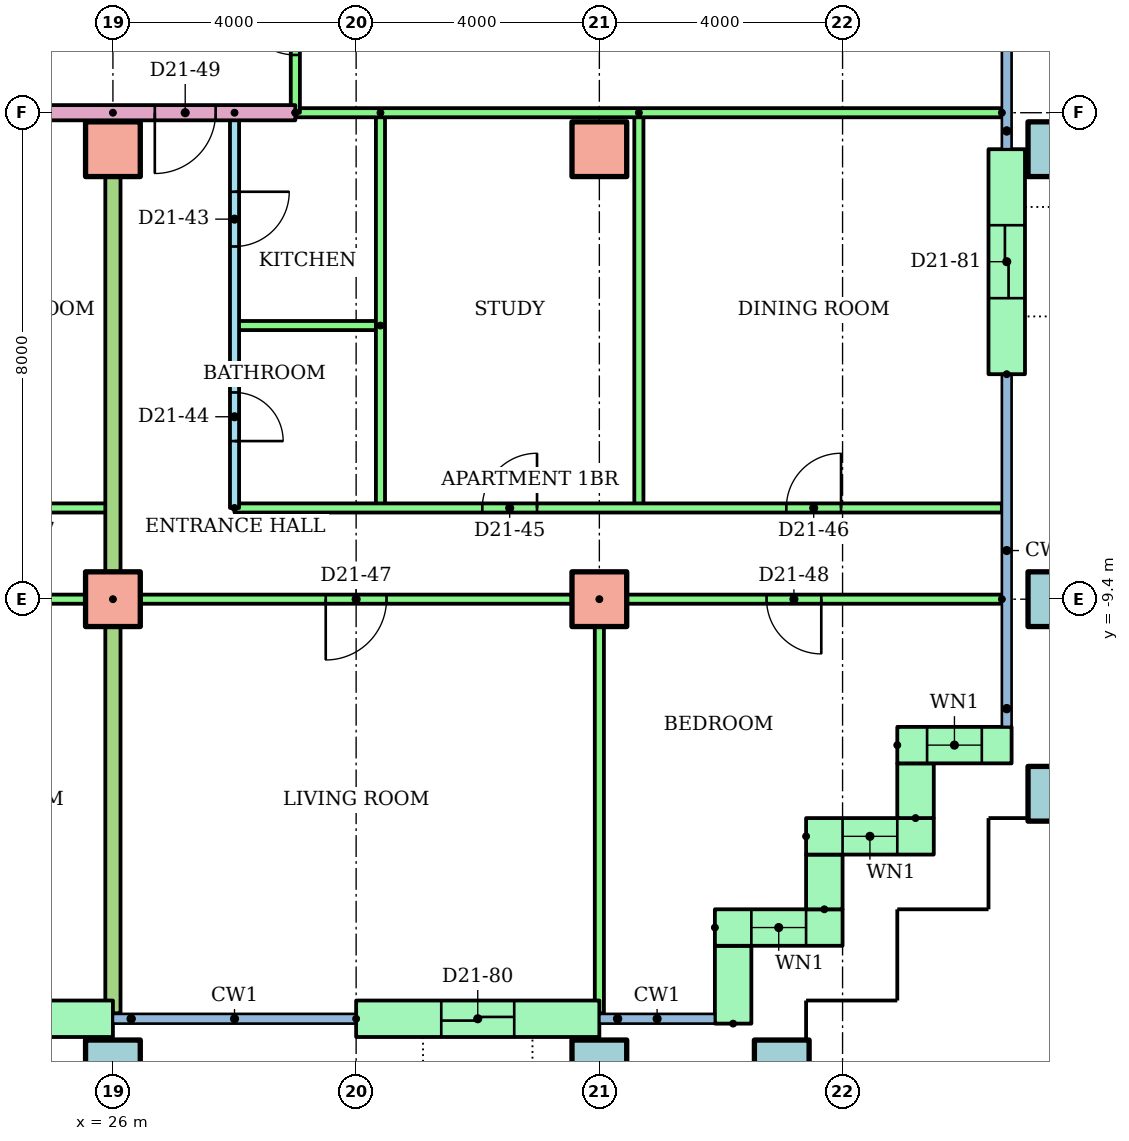
"""IFC4 building model, lengths in metres.
Left out: names, types, materials, properties, quantities, classifications, styles, units other than length and angle.
Written with IfcOpenShell. Run it as: python <this file> out.ifc"""

import sys

from ifc_helpers import new_model, si_unit, direction, frame, frame_2d, origin, origin_2d, place, context, subcontext, project, spatial, rectangle, hollow_rectangle, extrude, element, fill, save


model = new_model("IFC4")
c1 = context("Model", 3, precision=1e-05, world=origin(), true_north=direction((0.0, 1.0)))
c2 = subcontext(c1, "Body", "Model", "MODEL_VIEW")
j1 = project(units=[si_unit("LENGTHUNIT", "METRE"), si_unit("PLANEANGLEUNIT", "RADIAN")], contexts=[c1])
p1 = place(None, origin())
s1 = spatial("IfcSite", under=j1, at=p1, CompositionType="ELEMENT")
p2 = place(p1, origin())
s2 = spatial("IfcBuilding", under=s1, at=p2, CompositionType="ELEMENT")
p3 = place(p2, frame((0.0, 0.0, 83.9)))
s3 = spatial("IfcBuildingStorey", under=s2, at=p3, CompositionType="ELEMENT", Elevation=83.9)
for number, where in (
    (1, (26.0, -17.1, 0.0)),
    (2, (34.0, -17.1, 0.0)),
    (3, (37.0, -17.1, 0.0)),
    (4, (41.5, -12.6, 0.0)),
):
    element("IfcColumn", number, at=place(p3, frame(where)), inside=s3, PredefinedType="COLUMN", context=c2, shape_type="SweptSolid", body=[
        extrude(hollow_rectangle(XDim=0.9, YDim=0.9, WallThickness=0.045, at=origin_2d()), origin(), (0.0, 0.0, 1.0), 3.2),
    ])
for number, where in (
    (5, (26.0, -9.4, 0.0)),
    (6, (34.0, -9.4, 0.0)),
):
    element("IfcColumn", number, at=place(p3, frame(where)), inside=s3, PredefinedType="COLUMN", context=c2, shape_type="SweptSolid", body=[
        extrude(rectangle(XDim=0.9, YDim=0.9, at=origin_2d()), origin(), (0.0, 0.0, 1.0), 3.2),
    ])
p4 = place(p3, frame((41.5, -9.4, 0.0)))
e7 = element("IfcColumn", 7, at=p4, inside=s3, PredefinedType="COLUMN", context=c2, shape_type="SweptSolid", body=[
    extrude(hollow_rectangle(XDim=0.9, YDim=0.9, WallThickness=0.045, at=origin_2d()), origin(), (0.0, 0.0, 1.0), 3.2),
])
for number, where in (
    (8, (26.0, -2.0, 0.0)),
    (9, (34.0, -2.0, 0.0)),
):
    element("IfcColumn", number, at=place(p3, frame(where)), inside=s3, PredefinedType="COLUMN", context=c2, shape_type="SweptSolid", body=[
        extrude(rectangle(XDim=0.9, YDim=0.9, at=origin_2d()), origin(), (0.0, 0.0, 1.0), 3.2),
    ])
p5 = place(p3, frame((41.5, -2.0, 0.0)))
e10 = element("IfcColumn", 10, at=p5, inside=s3, PredefinedType="COLUMN", context=c2, shape_type="SweptSolid", body=[
    extrude(hollow_rectangle(XDim=0.9, YDim=0.9, WallThickness=0.045, at=origin_2d()), origin(), (0.0, 0.0, 1.0), 3.2),
])
p6 = place(p3, frame((22.0, -16.3, 0.0)))
e11 = element("IfcWall", 11, at=p6, inside=s3, PredefinedType="STANDARD", context=c2, shape_type="SweptSolid", body=[
    extrude(rectangle(XDim=4.0, YDim=0.6, at=frame_2d((2.0, 0.0))), origin(), (0.0, 0.0, 1.0), 2.92),
])
p7 = place(p6, frame((1.4, 0.0, 0.0)))
e12 = element("IfcOpeningElement", 12, at=p7, cuts=e11, PredefinedType="OPENING", context=c2, shape_type="SweptSolid", body=[
    extrude(rectangle(XDim=1.2, YDim=2.1, at=frame_2d((0.6, 1.05))), frame((0.0, 0.31, 0.0), z_axis=(0.0, -1.0, 0.0), x_axis=(1.0, 0.0, 0.0)), (0.0, 0.0, 1.0), 0.62),
])
p8 = place(p3, frame((30.0, -16.3, 0.0)))
e13 = element("IfcWall", 13, at=p8, inside=s3, PredefinedType="STANDARD", context=c2, shape_type="SweptSolid", body=[
    extrude(rectangle(XDim=4.0, YDim=0.6, at=frame_2d((2.0, 0.0))), origin(), (0.0, 0.0, 1.0), 2.92),
])
p9 = place(p8, frame((1.4, 0.0, 0.0)))
e14 = element("IfcOpeningElement", 14, at=p9, cuts=e13, PredefinedType="OPENING", context=c2, shape_type="SweptSolid", body=[
    extrude(rectangle(XDim=1.2, YDim=2.1, at=frame_2d((0.6, 1.05))), frame((0.0, 0.31, 0.0), z_axis=(0.0, -1.0, 0.0), x_axis=(1.0, 0.0, 0.0)), (0.0, 0.0, 1.0), 0.62),
])
p10 = place(p3, frame((36.2, -16.38, 0.0), z_axis=(0.0, 0.0, 1.0), x_axis=(0.0, 1.0, 0.0)))
e15 = element("IfcWall", 15, at=p10, inside=s3, PredefinedType="STANDARD", context=c2, shape_type="SweptSolid", body=[
    extrude(rectangle(XDim=1.28, YDim=0.6, at=frame_2d((0.64, 0.0))), origin(), (0.0, 0.0, 1.0), 2.92),
])
p11 = place(p3, frame((35.9, -14.8, 0.0)))
e16 = element("IfcWall", 16, at=p11, inside=s3, PredefinedType="STANDARD", context=c2, shape_type="SweptSolid", body=[
    extrude(rectangle(XDim=2.1, YDim=0.6, at=frame_2d((1.05, 0.0))), origin(), (0.0, 0.0, 1.0), 2.92),
])
p12 = place(p11, frame((0.6, 0.0, 0.9)))
e17 = element("IfcOpeningElement", 17, at=p12, cuts=e16, PredefinedType="OPENING", context=c2, shape_type="SweptSolid", body=[
    extrude(rectangle(XDim=0.9, YDim=1.5, at=frame_2d((0.45, 0.75))), frame((0.0, 0.31, 0.0), z_axis=(0.0, -1.0, 0.0), x_axis=(1.0, 0.0, 0.0)), (0.0, 0.0, 1.0), 0.62),
])
p13 = place(p3, frame((37.7, -14.5, 0.0), z_axis=(0.0, 0.0, 1.0), x_axis=(0.0, 1.0, 0.0)))
e18 = element("IfcWall", 18, at=p13, inside=s3, PredefinedType="STANDARD", context=c2, shape_type="SweptSolid", body=[
    extrude(rectangle(XDim=0.9, YDim=0.6, at=frame_2d((0.45, 0.0))), origin(), (0.0, 0.0, 1.0), 2.92),
])
p14 = place(p3, frame((37.4, -13.3, 0.0)))
e19 = element("IfcWall", 19, at=p14, inside=s3, PredefinedType="STANDARD", context=c2, shape_type="SweptSolid", body=[
    extrude(rectangle(XDim=2.1, YDim=0.6, at=frame_2d((1.05, 0.0))), origin(), (0.0, 0.0, 1.0), 2.92),
])
p15 = place(p14, frame((0.6, 0.0, 0.9)))
e20 = element("IfcOpeningElement", 20, at=p15, cuts=e19, PredefinedType="OPENING", context=c2, shape_type="SweptSolid", body=[
    extrude(rectangle(XDim=0.9, YDim=1.5, at=frame_2d((0.45, 0.75))), frame((0.0, 0.31, 0.0), z_axis=(0.0, -1.0, 0.0), x_axis=(1.0, 0.0, 0.0)), (0.0, 0.0, 1.0), 0.62),
])
p16 = place(p3, frame((39.2, -13.0, 0.0), z_axis=(0.0, 0.0, 1.0), x_axis=(0.0, 1.0, 0.0)))
e21 = element("IfcWall", 21, at=p16, inside=s3, PredefinedType="STANDARD", context=c2, shape_type="SweptSolid", body=[
    extrude(rectangle(XDim=0.9, YDim=0.6, at=frame_2d((0.45, 0.0))), origin(), (0.0, 0.0, 1.0), 2.92),
])
p17 = place(p3, frame((38.9, -11.8, 0.0)))
e22 = element("IfcWall", 22, at=p17, inside=s3, PredefinedType="STANDARD", context=c2, shape_type="SweptSolid", body=[
    extrude(rectangle(XDim=1.88, YDim=0.6, at=frame_2d((0.94, 0.0))), origin(), (0.0, 0.0, 1.0), 2.92),
])
p18 = place(p17, frame((0.49, 0.0, 0.9)))
e23 = element("IfcOpeningElement", 23, at=p18, cuts=e22, PredefinedType="OPENING", context=c2, shape_type="SweptSolid", body=[
    extrude(rectangle(XDim=0.9, YDim=1.5, at=frame_2d((0.45, 0.75))), frame((0.0, 0.31, 0.0), z_axis=(0.0, -1.0, 0.0), x_axis=(1.0, 0.0, 0.0)), (0.0, 0.0, 1.0), 0.62),
])
p19 = place(p3, frame((40.7, -5.7, 0.0), z_axis=(0.0, 0.0, 1.0), x_axis=(0.0, 1.0, 0.0)))
e24 = element("IfcWall", 24, at=p19, inside=s3, PredefinedType="STANDARD", context=c2, shape_type="SweptSolid", body=[
    extrude(rectangle(XDim=3.7, YDim=0.6, at=frame_2d((1.85, 0.0))), origin(), (0.0, 0.0, 1.0), 2.92),
])
p20 = place(p19, frame((1.25, 0.0, 0.0)))
e25 = element("IfcOpeningElement", 25, at=p20, cuts=e24, PredefinedType="OPENING", context=c2, shape_type="SweptSolid", body=[
    extrude(rectangle(XDim=1.2, YDim=2.1, at=frame_2d((0.6, 1.05))), frame((0.0, 0.31, 0.0), z_axis=(0.0, -1.0, 0.0), x_axis=(1.0, 0.0, 0.0)), (0.0, 0.0, 1.0), 0.62),
])
p21 = place(p3, frame((12.0, -7.9, 0.0)))
e26 = element("IfcWall", 26, at=p21, inside=s3, PredefinedType="PARTITIONING", context=c2, shape_type="SweptSolid", body=[
    extrude(rectangle(XDim=14.0, YDim=0.15, at=frame_2d((7.0, 0.0))), origin(), (0.0, 0.0, 1.0), 2.4),
])
p22 = place(p21, frame((4.325, 0.0, 0.0)))
e27 = element("IfcOpeningElement", 27, at=p22, cuts=e26, PredefinedType="OPENING", context=c2, shape_type="SweptSolid", body=[
    extrude(rectangle(XDim=0.9, YDim=2.1, at=frame_2d((0.45, 1.05))), frame((0.0, 0.085, 0.0), z_axis=(0.0, -1.0, 0.0), x_axis=(1.0, 0.0, 0.0)), (0.0, 0.0, 1.0), 0.17),
])
p23 = place(p21, frame((8.575, 0.0, 0.0)))
e28 = element("IfcOpeningElement", 28, at=p23, cuts=e26, PredefinedType="OPENING", context=c2, shape_type="SweptSolid", body=[
    extrude(rectangle(XDim=0.9, YDim=2.1, at=frame_2d((0.45, 1.05))), frame((0.0, 0.085, 0.0), z_axis=(0.0, -1.0, 0.0), x_axis=(1.0, 0.0, 0.0)), (0.0, 0.0, 1.0), 0.17),
])
p24 = place(p21, frame((12.0, 0.0, 0.0)))
e29 = element("IfcOpeningElement", 29, at=p24, cuts=e26, PredefinedType="OPENING", context=c2, shape_type="SweptSolid", body=[
    extrude(rectangle(XDim=0.9, YDim=2.1, at=frame_2d((0.45, 1.05))), frame((0.0, 0.085, 0.0), z_axis=(0.0, -1.0, 0.0), x_axis=(1.0, 0.0, 0.0)), (0.0, 0.0, 1.0), 0.17),
])
p25 = place(p3, frame((26.0, -9.4, 0.0), z_axis=(0.0, 0.0, 1.0), x_axis=(-1.0, 0.0, 0.0)))
e30 = element("IfcWall", 30, at=p25, inside=s3, PredefinedType="PARTITIONING", context=c2, shape_type="SweptSolid", body=[
    extrude(rectangle(XDim=16.0, YDim=0.15, at=frame_2d((8.0, 0.0))), origin(), (0.0, 0.0, 1.0), 2.4),
])
p26 = place(p25, frame((13.55, 0.0, 0.0)))
e31 = element("IfcOpeningElement", 31, at=p26, cuts=e30, PredefinedType="OPENING", context=c2, shape_type="SweptSolid", body=[
    extrude(rectangle(XDim=0.9, YDim=2.1, at=frame_2d((0.45, 1.05))), frame((0.0, 0.085, 0.0), z_axis=(0.0, -1.0, 0.0), x_axis=(1.0, 0.0, 0.0)), (0.0, 0.0, 1.0), 0.17),
])
p27 = place(p25, frame((9.55, 0.0, 0.0)))
e32 = element("IfcOpeningElement", 32, at=p27, cuts=e30, PredefinedType="OPENING", context=c2, shape_type="SweptSolid", body=[
    extrude(rectangle(XDim=0.9, YDim=2.1, at=frame_2d((0.45, 1.05))), frame((0.0, 0.085, 0.0), z_axis=(0.0, -1.0, 0.0), x_axis=(1.0, 0.0, 0.0)), (0.0, 0.0, 1.0), 0.17),
])
p28 = place(p25, frame((5.55, 0.0, 0.0)))
e33 = element("IfcOpeningElement", 33, at=p28, cuts=e30, PredefinedType="OPENING", context=c2, shape_type="SweptSolid", body=[
    extrude(rectangle(XDim=0.9, YDim=2.1, at=frame_2d((0.45, 1.05))), frame((0.0, 0.085, 0.0), z_axis=(0.0, -1.0, 0.0), x_axis=(1.0, 0.0, 0.0)), (0.0, 0.0, 1.0), 0.17),
])
p29 = place(p25, frame((1.5, 0.0, 0.0)))
e34 = element("IfcOpeningElement", 34, at=p29, cuts=e30, PredefinedType="OPENING", context=c2, shape_type="SweptSolid", body=[
    extrude(rectangle(XDim=1.0, YDim=2.1, at=frame_2d((0.5, 1.05))), frame((0.0, 0.085, 0.0), z_axis=(0.0, -1.0, 0.0), x_axis=(1.0, 0.0, 0.0)), (0.0, 0.0, 1.0), 0.17),
])
p30 = place(p3, frame((28.0, -1.4, 0.0), z_axis=(0.0, 0.0, 1.0), x_axis=(0.0, -1.0, 0.0)))
e35 = element("IfcWall", 35, at=p30, inside=s3, PredefinedType="PARTITIONING", context=c2, shape_type="SweptSolid", body=[
    extrude(rectangle(XDim=6.5, YDim=0.15, at=frame_2d((3.25, 0.0))), origin(), (0.0, 0.0, 1.0), 2.4),
])
p31 = place(p30, frame((1.3, 0.0, 0.0)))
e36 = element("IfcOpeningElement", 36, at=p31, cuts=e35, PredefinedType="OPENING", context=c2, shape_type="SweptSolid", body=[
    extrude(rectangle(XDim=0.9, YDim=2.1, at=frame_2d((0.45, 1.05))), frame((0.0, 0.085, 0.0), z_axis=(0.0, -1.0, 0.0), x_axis=(1.0, 0.0, 0.0)), (0.0, 0.0, 1.0), 0.17),
])
p32 = place(p30, frame((4.6, 0.0, 0.0)))
e37 = element("IfcOpeningElement", 37, at=p32, cuts=e35, PredefinedType="OPENING", context=c2, shape_type="SweptSolid", body=[
    extrude(rectangle(XDim=0.8, YDim=2.1, at=frame_2d((0.4, 1.05))), frame((0.0, 0.085, 0.0), z_axis=(0.0, -1.0, 0.0), x_axis=(1.0, 0.0, 0.0)), (0.0, 0.0, 1.0), 0.17),
])
p33 = place(p3, frame((30.4, -4.9, 0.0), z_axis=(0.0, 0.0, 1.0), x_axis=(-1.0, 0.0, 0.0)))
e38 = element("IfcWall", 38, at=p33, inside=s3, PredefinedType="PARTITIONING", context=c2, shape_type="SweptSolid", body=[
    extrude(rectangle(XDim=2.4, YDim=0.15, at=frame_2d((1.2, 0.0))), origin(), (0.0, 0.0, 1.0), 2.4),
])
for number, where, z_axis, x_axis in (
    (39, (30.4, -1.4, 0.0), (0.0, 0.0, 1.0), (0.0, -1.0, 0.0)),
    (40, (34.65, -1.4, 0.0), (0.0, 0.0, 1.0), (0.0, -1.0, 0.0)),
):
    element("IfcWall", number, at=place(p3, frame(where, z_axis=z_axis, x_axis=x_axis)), inside=s3, PredefinedType="PARTITIONING", context=c2, shape_type="SweptSolid", body=[
        extrude(rectangle(XDim=6.5, YDim=0.15, at=frame_2d((3.25, 0.0))), origin(), (0.0, 0.0, 1.0), 2.4),
    ])
p34 = place(p3, frame((28.0, -7.9, 0.0)))
e41 = element("IfcWall", 41, at=p34, inside=s3, PredefinedType="PARTITIONING", context=c2, shape_type="SweptSolid", body=[
    extrude(rectangle(XDim=12.62, YDim=0.15, at=frame_2d((6.31, 0.0))), origin(), (0.0, 0.0, 1.0), 2.4),
])
p35 = place(p34, frame((4.075, 0.0, 0.0)))
e42 = element("IfcOpeningElement", 42, at=p35, cuts=e41, PredefinedType="OPENING", context=c2, shape_type="SweptSolid", body=[
    extrude(rectangle(XDim=0.9, YDim=2.1, at=frame_2d((0.45, 1.05))), frame((0.0, 0.085, 0.0), z_axis=(0.0, -1.0, 0.0), x_axis=(1.0, 0.0, 0.0)), (0.0, 0.0, 1.0), 0.17),
])
p36 = place(p34, frame((9.075, 0.0, 0.0)))
e43 = element("IfcOpeningElement", 43, at=p36, cuts=e41, PredefinedType="OPENING", context=c2, shape_type="SweptSolid", body=[
    extrude(rectangle(XDim=0.9, YDim=2.1, at=frame_2d((0.45, 1.05))), frame((0.0, 0.085, 0.0), z_axis=(0.0, -1.0, 0.0), x_axis=(1.0, 0.0, 0.0)), (0.0, 0.0, 1.0), 0.17),
])
p37 = place(p3, frame((40.62, -9.4, 0.0), z_axis=(0.0, 0.0, 1.0), x_axis=(-1.0, 0.0, 0.0)))
e44 = element("IfcWall", 44, at=p37, inside=s3, PredefinedType="PARTITIONING", context=c2, shape_type="SweptSolid", body=[
    extrude(rectangle(XDim=14.62, YDim=0.15, at=frame_2d((7.31, 0.0))), origin(), (0.0, 0.0, 1.0), 2.4),
])
p38 = place(p37, frame((10.12, 0.0, 0.0)))
e45 = element("IfcOpeningElement", 45, at=p38, cuts=e44, PredefinedType="OPENING", context=c2, shape_type="SweptSolid", body=[
    extrude(rectangle(XDim=1.0, YDim=2.1, at=frame_2d((0.5, 1.05))), frame((0.0, 0.085, 0.0), z_axis=(0.0, -1.0, 0.0), x_axis=(1.0, 0.0, 0.0)), (0.0, 0.0, 1.0), 0.17),
])
p39 = place(p37, frame((2.97, 0.0, 0.0)))
e46 = element("IfcOpeningElement", 46, at=p39, cuts=e44, PredefinedType="OPENING", context=c2, shape_type="SweptSolid", body=[
    extrude(rectangle(XDim=0.9, YDim=2.1, at=frame_2d((0.45, 1.05))), frame((0.0, 0.085, 0.0), z_axis=(0.0, -1.0, 0.0), x_axis=(1.0, 0.0, 0.0)), (0.0, 0.0, 1.0), 0.17),
])
p40 = place(p3, frame((34.0, -9.4, 0.0), z_axis=(0.0, 0.0, 1.0), x_axis=(0.0, -1.0, 0.0)))
e47 = element("IfcWall", 47, at=p40, inside=s3, PredefinedType="PARTITIONING", context=c2, shape_type="SweptSolid", body=[
    extrude(rectangle(XDim=6.81, YDim=0.15, at=frame_2d((3.405, 0.0))), origin(), (0.0, 0.0, 1.0), 2.4),
])
p41 = place(p3, frame((26.0, -1.4, 0.0), z_axis=(0.0, 0.0, 1.0), x_axis=(0.0, -1.0, 0.0)))
e48 = element("IfcWall", 48, at=p41, inside=s3, PredefinedType="PARTITIONING", context=c2, shape_type="SweptSolid", body=[
    extrude(rectangle(XDim=14.81, YDim=0.25, at=frame_2d((7.405, 0.0))), origin(), (0.0, 0.0, 1.0), 2.4),
])
p42 = place(p3, frame((29.0, -1.4, 0.0), z_axis=(0.0, 0.0, 1.0), x_axis=(-1.0, 0.0, 0.0)))
e49 = element("IfcWall", 49, at=p42, inside=s3, PredefinedType="PARTITIONING", context=c2, shape_type="SweptSolid", body=[
    extrude(rectangle(XDim=15.0, YDim=0.25, at=frame_2d((7.5, 0.0))), origin(), (0.0, 0.0, 1.0), 2.4),
])
p43 = place(p42, frame((1.311, 0.0, 0.0)))
e50 = element("IfcOpeningElement", 50, at=p43, cuts=e49, PredefinedType="OPENING", context=c2, shape_type="SweptSolid", body=[
    extrude(rectangle(XDim=1.0, YDim=2.1, at=frame_2d((0.5, 1.05))), frame((0.0, 0.135, 0.0), z_axis=(0.0, -1.0, 0.0), x_axis=(1.0, 0.0, 0.0)), (0.0, 0.0, 1.0), 0.27),
])
p44 = place(p3, frame((40.62, -1.4, 0.0), z_axis=(0.0, 0.0, 1.0), x_axis=(-1.0, 0.0, 0.0)))
e51 = element("IfcWall", 51, at=p44, inside=s3, PredefinedType="PARTITIONING", context=c2, shape_type="SweptSolid", body=[
    extrude(rectangle(XDim=11.62, YDim=0.15, at=frame_2d((5.81, 0.0))), origin(), (0.0, 0.0, 1.0), 2.4),
])
p45 = place(p3, frame((29.0, -1.4, 0.0), z_axis=(0.0, 0.0, 1.0), x_axis=(0.0, 1.0, 0.0)))
e52 = element("IfcWall", 52, at=p45, inside=s3, PredefinedType="PARTITIONING", context=c2, shape_type="SweptSolid", body=[
    extrude(rectangle(XDim=2.8, YDim=0.15, at=frame_2d((1.4, 0.0))), origin(), (0.0, 0.0, 1.0), 2.4),
])
p46 = place(p45, frame((0.95, 0.0, 0.0)))
e53 = element("IfcOpeningElement", 53, at=p46, cuts=e52, PredefinedType="OPENING", context=c2, shape_type="SweptSolid", body=[
    extrude(rectangle(XDim=0.9, YDim=2.1, at=frame_2d((0.45, 1.05))), frame((0.0, 0.085, 0.0), z_axis=(0.0, -1.0, 0.0), x_axis=(1.0, 0.0, 0.0)), (0.0, 0.0, 1.0), 0.17),
])
p47 = place(p12, origin())
e54 = element("IfcWindow", 54, at=p47, inside=s3, PartitioningType="SINGLE_PANEL", PredefinedType="WINDOW", context=c2, shape_type="SweptSolid", body=[
    extrude(rectangle(XDim=0.9, YDim=1.5, at=frame_2d((0.45, 0.75))), frame((0.0, 0.03, 0.0), z_axis=(0.0, -1.0, 0.0), x_axis=(1.0, 0.0, 0.0)), (0.0, 0.0, 1.0), 0.06),
])
fill(e17, e54)
p48 = place(p15, origin())
e55 = element("IfcWindow", 55, at=p48, inside=s3, PartitioningType="SINGLE_PANEL", PredefinedType="WINDOW", context=c2, shape_type="SweptSolid", body=[
    extrude(rectangle(XDim=0.9, YDim=1.5, at=frame_2d((0.45, 0.75))), frame((0.0, 0.03, 0.0), z_axis=(0.0, -1.0, 0.0), x_axis=(1.0, 0.0, 0.0)), (0.0, 0.0, 1.0), 0.06),
])
fill(e20, e55)
p49 = place(p18, origin())
e56 = element("IfcWindow", 56, at=p49, inside=s3, PartitioningType="SINGLE_PANEL", PredefinedType="WINDOW", context=c2, shape_type="SweptSolid", body=[
    extrude(rectangle(XDim=0.9, YDim=1.5, at=frame_2d((0.45, 0.75))), frame((0.0, 0.03, 0.0), z_axis=(0.0, -1.0, 0.0), x_axis=(1.0, 0.0, 0.0)), (0.0, 0.0, 1.0), 0.06),
])
fill(e23, e56)
p50 = place(p31, origin())
e57 = element("IfcDoor", 57, at=p50, inside=s3, OperationType="SINGLE_SWING_LEFT", PredefinedType="DOOR", context=c2, shape_type="SweptSolid", body=[
    extrude(rectangle(XDim=0.9, YDim=2.1, at=frame_2d((0.45, 1.05))), frame((0.0, 0.025, 0.0), z_axis=(0.0, -1.0, 0.0), x_axis=(1.0, 0.0, 0.0)), (0.0, 0.0, 1.0), 0.05),
])
fill(e36, e57)
p51 = place(p32, origin())
e58 = element("IfcDoor", 58, at=p51, inside=s3, OperationType="SINGLE_SWING_RIGHT", PredefinedType="DOOR", context=c2, shape_type="SweptSolid", body=[
    extrude(rectangle(XDim=0.8, YDim=2.1, at=frame_2d((0.4, 1.05))), frame((0.0, 0.025, 0.0), z_axis=(0.0, -1.0, 0.0), x_axis=(1.0, 0.0, 0.0)), (0.0, 0.0, 1.0), 0.05),
])
fill(e37, e58)
p52 = place(p35, origin())
e59 = element("IfcDoor", 59, at=p52, inside=s3, OperationType="SINGLE_SWING_RIGHT", PredefinedType="DOOR", context=c2, shape_type="SweptSolid", body=[
    extrude(rectangle(XDim=0.9, YDim=2.1, at=frame_2d((0.45, 1.05))), frame((0.0, 0.025, 0.0), z_axis=(0.0, -1.0, 0.0), x_axis=(1.0, 0.0, 0.0)), (0.0, 0.0, 1.0), 0.05),
])
fill(e42, e59)
p53 = place(p36, origin())
e60 = element("IfcDoor", 60, at=p53, inside=s3, OperationType="SINGLE_SWING_RIGHT", PredefinedType="DOOR", context=c2, shape_type="SweptSolid", body=[
    extrude(rectangle(XDim=0.9, YDim=2.1, at=frame_2d((0.45, 1.05))), frame((0.0, 0.025, 0.0), z_axis=(0.0, -1.0, 0.0), x_axis=(1.0, 0.0, 0.0)), (0.0, 0.0, 1.0), 0.05),
])
fill(e43, e60)
p54 = place(p38, origin())
e61 = element("IfcDoor", 61, at=p54, inside=s3, OperationType="SINGLE_SWING_RIGHT", PredefinedType="DOOR", context=c2, shape_type="SweptSolid", body=[
    extrude(rectangle(XDim=1.0, YDim=2.1, at=frame_2d((0.5, 1.05))), frame((0.0, 0.025, 0.0), z_axis=(0.0, -1.0, 0.0), x_axis=(1.0, 0.0, 0.0)), (0.0, 0.0, 1.0), 0.05),
])
fill(e45, e61)
p55 = place(p39, origin())
e62 = element("IfcDoor", 62, at=p55, inside=s3, OperationType="SINGLE_SWING_LEFT", PredefinedType="DOOR", context=c2, shape_type="SweptSolid", body=[
    extrude(rectangle(XDim=0.9, YDim=2.1, at=frame_2d((0.45, 1.05))), frame((0.0, 0.025, 0.0), z_axis=(0.0, -1.0, 0.0), x_axis=(1.0, 0.0, 0.0)), (0.0, 0.0, 1.0), 0.05),
])
fill(e46, e62)
p56 = place(p43, origin())
e63 = element("IfcDoor", 63, at=p56, inside=s3, OperationType="SINGLE_SWING_RIGHT", PredefinedType="DOOR", context=c2, shape_type="SweptSolid", body=[
    extrude(rectangle(XDim=1.0, YDim=2.1, at=frame_2d((0.5, 1.05))), frame((0.0, 0.025, 0.0), z_axis=(0.0, -1.0, 0.0), x_axis=(1.0, 0.0, 0.0)), (0.0, 0.0, 1.0), 0.05),
])
fill(e50, e63)
p57 = place(p46, origin())
e64 = element("IfcDoor", 64, at=p57, inside=s3, OperationType="SINGLE_SWING_RIGHT", PredefinedType="DOOR", context=c2, shape_type="SweptSolid", body=[
    extrude(rectangle(XDim=0.9, YDim=2.1, at=frame_2d((0.45, 1.05))), frame((0.0, 0.025, 0.0), z_axis=(0.0, -1.0, 0.0), x_axis=(1.0, 0.0, 0.0)), (0.0, 0.0, 1.0), 0.05),
])
fill(e53, e64)
p58 = place(p9, origin())
e65 = element("IfcDoor", 65, at=p58, inside=s3, OperationType="SLIDING_TO_LEFT", PredefinedType="DOOR", context=c2, shape_type="SweptSolid", body=[
    extrude(rectangle(XDim=1.2, YDim=2.1, at=frame_2d((0.6, 1.05))), frame((0.0, 0.025, 0.0), z_axis=(0.0, -1.0, 0.0), x_axis=(1.0, 0.0, 0.0)), (0.0, 0.0, 1.0), 0.05),
])
fill(e14, e65)
p59 = place(p20, origin())
e66 = element("IfcDoor", 66, at=p59, inside=s3, OperationType="SLIDING_TO_LEFT", PredefinedType="DOOR", context=c2, shape_type="SweptSolid", body=[
    extrude(rectangle(XDim=1.2, YDim=2.1, at=frame_2d((0.6, 1.05))), frame((0.0, 0.025, 0.0), z_axis=(0.0, -1.0, 0.0), x_axis=(1.0, 0.0, 0.0)), (0.0, 0.0, 1.0), 0.05),
])
fill(e25, e66)
save(model, sys.argv[1])
